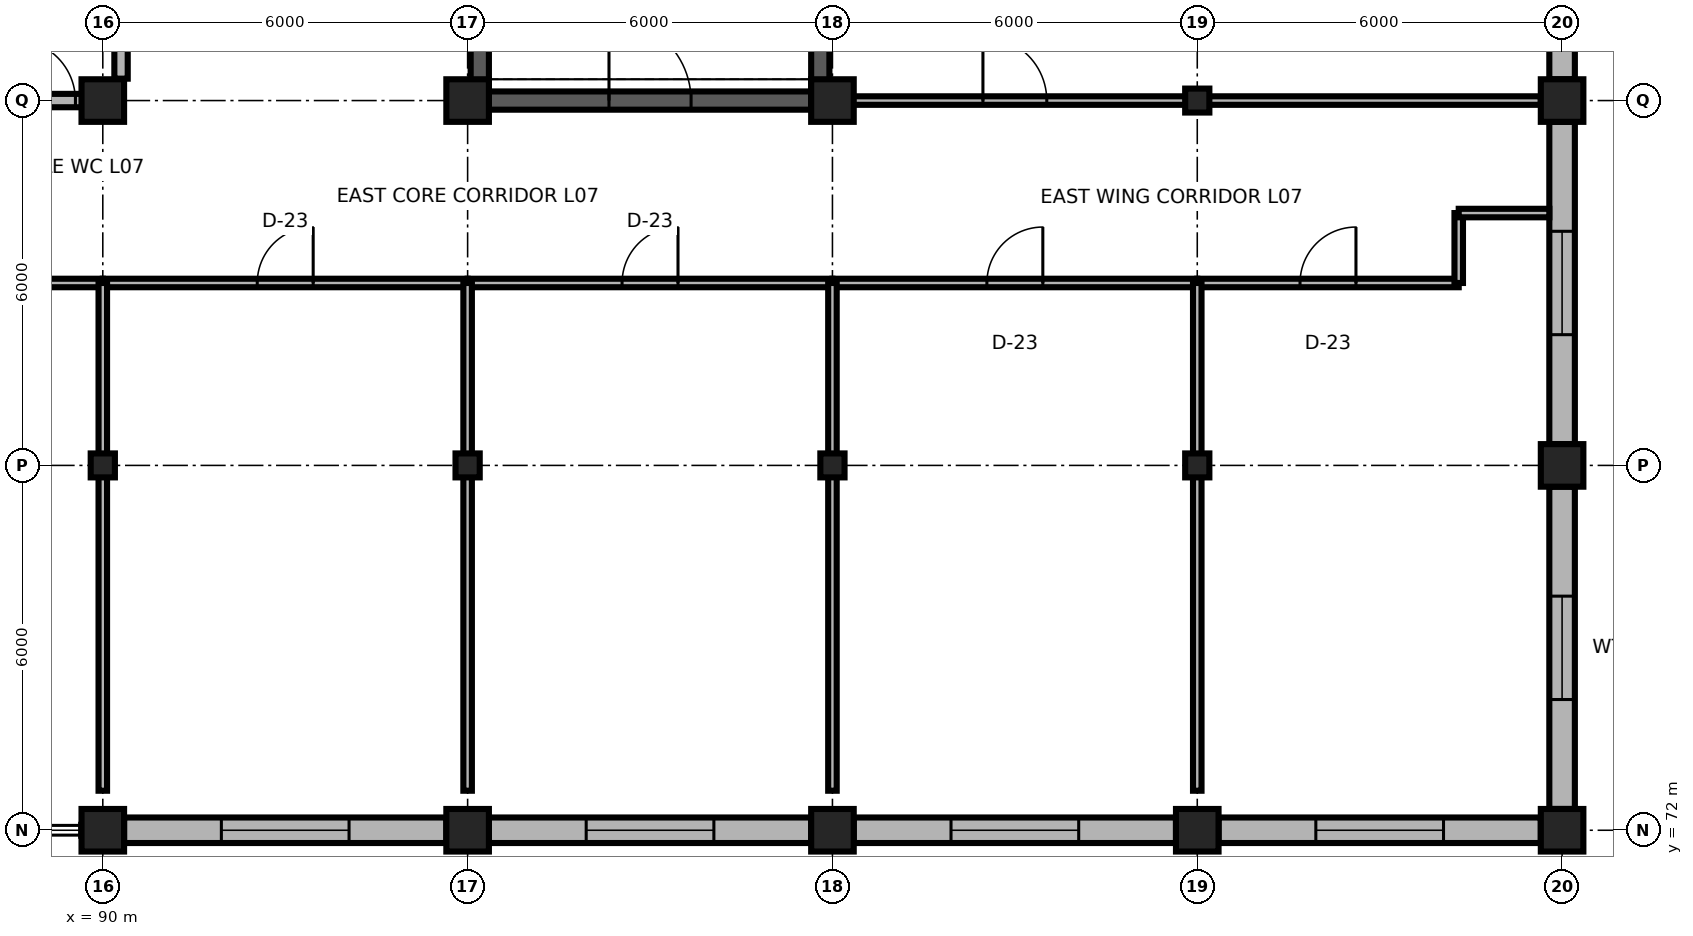
"""IFC4 building model, lengths in metres.
Left out: names, types, materials, properties, quantities, classifications, styles, units other than length and angle.
Written with IfcOpenShell. Run it as: python <this file> out.ifc"""

import sys

from ifc_helpers import new_model, si_unit, direction, frame, frame_2d, origin, origin_2d, place, context, subcontext, project, spatial, rectangle, i_section, extrude, element, fill, save


model = new_model("IFC4")
c1 = context("Model", 3, precision=1e-05, world=origin(), true_north=direction((0.0, 1.0)))
c2 = subcontext(c1, "Body", "Model", "MODEL_VIEW")
j1 = project(units=[si_unit("LENGTHUNIT", "METRE"), si_unit("PLANEANGLEUNIT", "RADIAN")], contexts=[c1])
p1 = place(None, origin())
s1 = spatial("IfcSite", under=j1, at=p1, CompositionType="ELEMENT")
p2 = place(p1, origin())
s2 = spatial("IfcBuilding", under=s1, at=p2, CompositionType="ELEMENT")
p3 = place(p2, frame((0.0, 0.0, 28.8)))
s3 = spatial("IfcBuildingStorey", under=s2, at=p3, CompositionType="ELEMENT", Elevation=28.8)
for number, where, z_axis, x_axis in (
    (1, (90.0, 72.0, 0.0), (0.0, 0.0, 1.0), (1.0, 0.0, 0.0)),
    (2, (96.0, 72.0, 0.0), (0.0, 0.0, 1.0), (1.0, 0.0, 0.0)),
    (3, (102.0, 72.0, 0.0), (0.0, 0.0, 1.0), (1.0, 0.0, 0.0)),
    (4, (108.0, 72.0, 0.0), (0.0, 0.0, 1.0), (1.0, 0.0, 0.0)),
    (5, (114.0, 72.0, 0.0), (0.0, 0.0, 1.0), (1.0, 0.0, 0.0)),
):
    element("IfcColumn", number, at=place(p3, frame(where, z_axis=z_axis, x_axis=x_axis)), inside=s3, PredefinedType="COLUMN", context=c2, shape_type="SweptSolid", body=[
        extrude(rectangle(XDim=0.7, YDim=0.7, at=origin_2d()), origin(), (0.0, 0.0, 1.0), 3.9),
    ])
for number, where, z_axis, x_axis in (
    (6, (90.0, 78.0, 0.0), (0.0, 0.0, 1.0), (1.0, 0.0, 0.0)),
    (7, (96.0, 78.0, 0.0), (0.0, 0.0, 1.0), (1.0, 0.0, 0.0)),
    (8, (102.0, 78.0, 0.0), (0.0, 0.0, 1.0), (1.0, 0.0, 0.0)),
    (9, (108.0, 78.0, 0.0), (0.0, 0.0, 1.0), (1.0, 0.0, 0.0)),
):
    element("IfcColumn", number, at=place(p3, frame(where, z_axis=z_axis, x_axis=x_axis)), inside=s3, PredefinedType="COLUMN", context=c2, shape_type="SweptSolid", body=[
        extrude(i_section(OverallWidth=0.398, OverallDepth=0.394, WebThickness=0.011, FlangeThickness=0.018, FilletRadius=0.022, at=origin_2d()), origin(), (0.0, 0.0, 1.0), 3.9),
    ])
for number, where, z_axis, x_axis in (
    (10, (114.0, 78.0, 0.0), (0.0, 0.0, 1.0), (1.0, 0.0, 0.0)),
    (11, (90.0, 84.0, 0.0), (0.0, 0.0, 1.0), (1.0, 0.0, 0.0)),
    (12, (96.0, 84.0, 0.0), (0.0, 0.0, 1.0), (1.0, 0.0, 0.0)),
    (13, (102.0, 84.0, 0.0), (0.0, 0.0, 1.0), (1.0, 0.0, 0.0)),
):
    element("IfcColumn", number, at=place(p3, frame(where, z_axis=z_axis, x_axis=x_axis)), inside=s3, PredefinedType="COLUMN", context=c2, shape_type="SweptSolid", body=[
        extrude(rectangle(XDim=0.7, YDim=0.7, at=origin_2d()), origin(), (0.0, 0.0, 1.0), 3.9),
    ])
p4 = place(p3, frame((108.0, 84.0, 0.0), z_axis=(0.0, 0.0, 1.0), x_axis=(1.0, 0.0, 0.0)))
e14 = element("IfcColumn", 14, at=p4, inside=s3, PredefinedType="COLUMN", context=c2, shape_type="SweptSolid", body=[
    extrude(i_section(OverallWidth=0.398, OverallDepth=0.394, WebThickness=0.011, FlangeThickness=0.018, FilletRadius=0.022, at=origin_2d()), origin(), (0.0, 0.0, 1.0), 3.9),
])
p5 = place(p3, frame((114.0, 84.0, 0.0), z_axis=(0.0, 0.0, 1.0), x_axis=(1.0, 0.0, 0.0)))
e15 = element("IfcColumn", 15, at=p5, inside=s3, PredefinedType="COLUMN", context=c2, shape_type="SweptSolid", body=[
    extrude(rectangle(XDim=0.7, YDim=0.7, at=origin_2d()), origin(), (0.0, 0.0, 1.0), 3.9),
])
p6 = place(p3, frame((90.35, 72.0, 0.0), z_axis=(0.0, 0.0, 1.0), x_axis=(1.0, 0.0, 0.0)))
e16 = element("IfcWall", 16, at=p6, inside=s3, PredefinedType="SOLIDWALL", context=c2, shape_type="SweptSolid", body=[
    extrude(rectangle(XDim=5.3, YDim=0.42, at=frame_2d((2.65, 0.0))), origin(), (0.0, 0.0, 1.0), 3.32),
])
p7 = place(p6, frame((1.6, 0.0, 0.85)))
e17 = element("IfcOpeningElement", 17, at=p7, cuts=e16, PredefinedType="OPENING", context=c2, shape_type="SweptSolid", body=[
    extrude(rectangle(XDim=2.1, YDim=2.1, at=frame_2d((1.05, 1.05))), frame((0.0, 0.225, 0.0), z_axis=(0.0, -1.0, 0.0), x_axis=(1.0, 0.0, 0.0)), (0.0, 0.0, 1.0), 0.45),
])
p8 = place(p3, frame((96.35, 72.0, 0.0), z_axis=(0.0, 0.0, 1.0), x_axis=(1.0, 0.0, 0.0)))
e18 = element("IfcWall", 18, at=p8, inside=s3, PredefinedType="SOLIDWALL", context=c2, shape_type="SweptSolid", body=[
    extrude(rectangle(XDim=5.3, YDim=0.42, at=frame_2d((2.65, 0.0))), origin(), (0.0, 0.0, 1.0), 3.32),
])
p9 = place(p8, frame((1.6, 0.0, 0.85)))
e19 = element("IfcOpeningElement", 19, at=p9, cuts=e18, PredefinedType="OPENING", context=c2, shape_type="SweptSolid", body=[
    extrude(rectangle(XDim=2.1, YDim=2.1, at=frame_2d((1.05, 1.05))), frame((0.0, 0.225, 0.0), z_axis=(0.0, -1.0, 0.0), x_axis=(1.0, 0.0, 0.0)), (0.0, 0.0, 1.0), 0.45),
])
p10 = place(p3, frame((102.35, 72.0, 0.0), z_axis=(0.0, 0.0, 1.0), x_axis=(1.0, 0.0, 0.0)))
e20 = element("IfcWall", 20, at=p10, inside=s3, PredefinedType="SOLIDWALL", context=c2, shape_type="SweptSolid", body=[
    extrude(rectangle(XDim=5.3, YDim=0.42, at=frame_2d((2.65, 0.0))), origin(), (0.0, 0.0, 1.0), 3.32),
])
p11 = place(p10, frame((1.6, 0.0, 0.85)))
e21 = element("IfcOpeningElement", 21, at=p11, cuts=e20, PredefinedType="OPENING", context=c2, shape_type="SweptSolid", body=[
    extrude(rectangle(XDim=2.1, YDim=2.1, at=frame_2d((1.05, 1.05))), frame((0.0, 0.225, 0.0), z_axis=(0.0, -1.0, 0.0), x_axis=(1.0, 0.0, 0.0)), (0.0, 0.0, 1.0), 0.45),
])
p12 = place(p3, frame((108.35, 72.0, 0.0), z_axis=(0.0, 0.0, 1.0), x_axis=(1.0, 0.0, 0.0)))
e22 = element("IfcWall", 22, at=p12, inside=s3, PredefinedType="SOLIDWALL", context=c2, shape_type="SweptSolid", body=[
    extrude(rectangle(XDim=5.3, YDim=0.42, at=frame_2d((2.65, 0.0))), origin(), (0.0, 0.0, 1.0), 3.32),
])
p13 = place(p12, frame((1.6, 0.0, 0.85)))
e23 = element("IfcOpeningElement", 23, at=p13, cuts=e22, PredefinedType="OPENING", context=c2, shape_type="SweptSolid", body=[
    extrude(rectangle(XDim=2.1, YDim=2.1, at=frame_2d((1.05, 1.05))), frame((0.0, 0.225, 0.0), z_axis=(0.0, -1.0, 0.0), x_axis=(1.0, 0.0, 0.0)), (0.0, 0.0, 1.0), 0.45),
])
p14 = place(p3, frame((114.0, 72.35, 0.0), z_axis=(0.0, 0.0, 1.0), x_axis=(0.0, 1.0, 0.0)))
e24 = element("IfcWall", 24, at=p14, inside=s3, PredefinedType="SOLIDWALL", context=c2, shape_type="SweptSolid", body=[
    extrude(rectangle(XDim=5.3, YDim=0.42, at=frame_2d((2.65, 0.0))), origin(), (0.0, 0.0, 1.0), 3.32),
])
p15 = place(p14, frame((1.8, 0.0, 0.85)))
e25 = element("IfcOpeningElement", 25, at=p15, cuts=e24, PredefinedType="OPENING", context=c2, shape_type="SweptSolid", body=[
    extrude(rectangle(XDim=1.7, YDim=2.05, at=frame_2d((0.85, 1.025))), frame((0.0, 0.225, 0.0), z_axis=(0.0, -1.0, 0.0), x_axis=(1.0, 0.0, 0.0)), (0.0, 0.0, 1.0), 0.45),
])
p16 = place(p3, frame((114.0, 78.35, 0.0), z_axis=(0.0, 0.0, 1.0), x_axis=(0.0, 1.0, 0.0)))
e26 = element("IfcWall", 26, at=p16, inside=s3, PredefinedType="SOLIDWALL", context=c2, shape_type="SweptSolid", body=[
    extrude(rectangle(XDim=5.3, YDim=0.42, at=frame_2d((2.65, 0.0))), origin(), (0.0, 0.0, 1.0), 3.32),
])
p17 = place(p16, frame((1.8, 0.0, 0.85)))
e27 = element("IfcOpeningElement", 27, at=p17, cuts=e26, PredefinedType="OPENING", context=c2, shape_type="SweptSolid", body=[
    extrude(rectangle(XDim=1.7, YDim=2.05, at=frame_2d((0.85, 1.025))), frame((0.0, 0.225, 0.0), z_axis=(0.0, -1.0, 0.0), x_axis=(1.0, 0.0, 0.0)), (0.0, 0.0, 1.0), 0.45),
])
p18 = place(p3, frame((114.0, 84.35, 0.0), z_axis=(0.0, 0.0, 1.0), x_axis=(0.0, 1.0, 0.0)))
e28 = element("IfcWall", 28, at=p18, inside=s3, PredefinedType="SOLIDWALL", context=c2, shape_type="SweptSolid", body=[
    extrude(rectangle(XDim=5.3, YDim=0.42, at=frame_2d((2.65, 0.0))), origin(), (0.0, 0.0, 1.0), 3.32),
])
p19 = place(p18, frame((1.8, 0.0, 0.85)))
e29 = element("IfcOpeningElement", 29, at=p19, cuts=e28, PredefinedType="OPENING", context=c2, shape_type="SweptSolid", body=[
    extrude(rectangle(XDim=1.7, YDim=2.05, at=frame_2d((0.85, 1.025))), frame((0.0, 0.225, 0.0), z_axis=(0.0, -1.0, 0.0), x_axis=(1.0, 0.0, 0.0)), (0.0, 0.0, 1.0), 0.45),
])
p20 = place(p3, frame((96.35, 84.0, 0.0), z_axis=(0.0, 0.0, 1.0), x_axis=(1.0, 0.0, 0.0)))
e30 = element("IfcWall", 30, at=p20, inside=s3, PredefinedType="SHEAR", context=c2, shape_type="SweptSolid", body=[
    extrude(rectangle(XDim=5.3, YDim=0.3, at=frame_2d((2.65, 0.0))), origin(), (0.0, 0.0, 1.0), 3.66),
])
p21 = place(p20, frame((1.975, 0.0, 0.0)))
e31 = element("IfcOpeningElement", 31, at=p21, cuts=e30, PredefinedType="OPENING", context=c2, shape_type="SweptSolid", body=[
    extrude(rectangle(XDim=1.35, YDim=2.2, at=frame_2d((0.675, 1.1))), frame((0.0, 0.165, 0.0), z_axis=(0.0, -1.0, 0.0), x_axis=(1.0, 0.0, 0.0)), (0.0, 0.0, 1.0), 0.33),
])
for number, where, z_axis, x_axis in (
    (32, (96.2, 84.0, 0.0), (0.0, 0.0, 1.0), (0.0, 1.0, 0.0)),
    (33, (101.8, 84.0, 0.0), (0.0, 0.0, 1.0), (0.0, 1.0, 0.0)),
):
    element("IfcWall", number, at=place(p3, frame(where, z_axis=z_axis, x_axis=x_axis)), inside=s3, PredefinedType="SHEAR", context=c2, shape_type="SweptSolid", body=[
        extrude(rectangle(XDim=11.8, YDim=0.3, at=frame_2d((5.9, 0.0))), origin(), (0.0, 0.0, 1.0), 3.74),
    ])
p22 = place(p3, frame((87.8, 84.0, 0.0), z_axis=(0.0, 0.0, 1.0), x_axis=(1.0, 0.0, 0.0)))
e34 = element("IfcWall", 34, at=p22, inside=s3, PredefinedType="PARTITIONING", context=c2, shape_type="SweptSolid", body=[
    extrude(rectangle(XDim=2.5, YDim=0.22, at=frame_2d((1.25, 0.0))), origin(), (0.0, 0.0, 1.0), 3.352),
])
p23 = place(p22, frame((0.75, 0.0, 0.0)))
e35 = element("IfcOpeningElement", 35, at=p23, cuts=e34, PredefinedType="OPENING", context=c2, shape_type="SweptSolid", body=[
    extrude(rectangle(XDim=1.0, YDim=2.15, at=frame_2d((0.5, 1.075))), frame((0.0, 0.125, 0.0), z_axis=(0.0, -1.0, 0.0), x_axis=(1.0, 0.0, 0.0)), (0.0, 0.0, 1.0), 0.25),
])
p24 = place(p3, frame((84.0, 81.0, 0.0), z_axis=(0.0, 0.0, 1.0), x_axis=(1.0, 0.0, 0.0)))
e36 = element("IfcWall", 36, at=p24, inside=s3, PredefinedType="PARTITIONING", context=c2, shape_type="SweptSolid", body=[
    extrude(rectangle(XDim=6.0, YDim=0.14, at=frame_2d((3.0, 0.0))), origin(), (0.0, 0.0, 1.0), 3.74),
])
p25 = place(p24, frame((2.54, 0.0, 0.0)))
e37 = element("IfcOpeningElement", 37, at=p25, cuts=e36, PredefinedType="OPENING", context=c2, shape_type="SweptSolid", body=[
    extrude(rectangle(XDim=0.92, YDim=2.15, at=frame_2d((0.46, 1.075))), frame((0.0, 0.085, 0.0), z_axis=(0.0, -1.0, 0.0), x_axis=(1.0, 0.0, 0.0)), (0.0, 0.0, 1.0), 0.17),
])
p26 = place(p3, frame((90.0, 81.0, 0.0), z_axis=(0.0, 0.0, 1.0), x_axis=(1.0, 0.0, 0.0)))
e38 = element("IfcWall", 38, at=p26, inside=s3, PredefinedType="PARTITIONING", context=c2, shape_type="SweptSolid", body=[
    extrude(rectangle(XDim=6.0, YDim=0.14, at=frame_2d((3.0, 0.0))), origin(), (0.0, 0.0, 1.0), 3.74),
])
p27 = place(p26, frame((2.54, 0.0, 0.0)))
e39 = element("IfcOpeningElement", 39, at=p27, cuts=e38, PredefinedType="OPENING", context=c2, shape_type="SweptSolid", body=[
    extrude(rectangle(XDim=0.92, YDim=2.15, at=frame_2d((0.46, 1.075))), frame((0.0, 0.085, 0.0), z_axis=(0.0, -1.0, 0.0), x_axis=(1.0, 0.0, 0.0)), (0.0, 0.0, 1.0), 0.17),
])
p28 = place(p3, frame((96.0, 81.0, 0.0), z_axis=(0.0, 0.0, 1.0), x_axis=(1.0, 0.0, 0.0)))
e40 = element("IfcWall", 40, at=p28, inside=s3, PredefinedType="PARTITIONING", context=c2, shape_type="SweptSolid", body=[
    extrude(rectangle(XDim=6.0, YDim=0.14, at=frame_2d((3.0, 0.0))), origin(), (0.0, 0.0, 1.0), 3.74),
])
p29 = place(p28, frame((2.54, 0.0, 0.0)))
e41 = element("IfcOpeningElement", 41, at=p29, cuts=e40, PredefinedType="OPENING", context=c2, shape_type="SweptSolid", body=[
    extrude(rectangle(XDim=0.92, YDim=2.15, at=frame_2d((0.46, 1.075))), frame((0.0, 0.085, 0.0), z_axis=(0.0, -1.0, 0.0), x_axis=(1.0, 0.0, 0.0)), (0.0, 0.0, 1.0), 0.17),
])
p30 = place(p3, frame((102.0, 81.0, 0.0), z_axis=(0.0, 0.0, 1.0), x_axis=(1.0, 0.0, 0.0)))
e42 = element("IfcWall", 42, at=p30, inside=s3, PredefinedType="PARTITIONING", context=c2, shape_type="SweptSolid", body=[
    extrude(rectangle(XDim=6.0, YDim=0.14, at=frame_2d((3.0, 0.0))), origin(), (0.0, 0.0, 1.0), 3.74),
])
p31 = place(p30, frame((2.54, 0.0, 0.0)))
e43 = element("IfcOpeningElement", 43, at=p31, cuts=e42, PredefinedType="OPENING", context=c2, shape_type="SweptSolid", body=[
    extrude(rectangle(XDim=0.92, YDim=2.15, at=frame_2d((0.46, 1.075))), frame((0.0, 0.085, 0.0), z_axis=(0.0, -1.0, 0.0), x_axis=(1.0, 0.0, 0.0)), (0.0, 0.0, 1.0), 0.17),
])
p32 = place(p3, frame((108.0, 81.0, 0.0), z_axis=(0.0, 0.0, 1.0), x_axis=(1.0, 0.0, 0.0)))
e44 = element("IfcWall", 44, at=p32, inside=s3, PredefinedType="PARTITIONING", context=c2, shape_type="SweptSolid", body=[
    extrude(rectangle(XDim=4.3, YDim=0.14, at=frame_2d((2.15, 0.0))), origin(), (0.0, 0.0, 1.0), 3.74),
])
p33 = place(p32, frame((1.69, 0.0, 0.0)))
e45 = element("IfcOpeningElement", 45, at=p33, cuts=e44, PredefinedType="OPENING", context=c2, shape_type="SweptSolid", body=[
    extrude(rectangle(XDim=0.92, YDim=2.15, at=frame_2d((0.46, 1.075))), frame((0.0, 0.085, 0.0), z_axis=(0.0, -1.0, 0.0), x_axis=(1.0, 0.0, 0.0)), (0.0, 0.0, 1.0), 0.17),
])
p34 = place(p3, frame((102.0, 84.0, 0.0), z_axis=(0.0, 0.0, 1.0), x_axis=(1.0, 0.0, 0.0)))
e46 = element("IfcWall", 46, at=p34, inside=s3, PredefinedType="PARTITIONING", context=c2, shape_type="SweptSolid", body=[
    extrude(rectangle(XDim=6.0, YDim=0.14, at=frame_2d((3.0, 0.0))), origin(), (0.0, 0.0, 1.0), 3.352),
])
p35 = place(p34, frame((2.475, 0.0, 0.0)))
e47 = element("IfcOpeningElement", 47, at=p35, cuts=e46, PredefinedType="OPENING", context=c2, shape_type="SweptSolid", body=[
    extrude(rectangle(XDim=1.05, YDim=2.25, at=frame_2d((0.525, 1.125))), frame((0.0, 0.085, 0.0), z_axis=(0.0, -1.0, 0.0), x_axis=(1.0, 0.0, 0.0)), (0.0, 0.0, 1.0), 0.17),
])
for number, where, z_axis, x_axis in (
    (48, (90.0, 72.65, 0.0), (0.0, 0.0, 1.0), (0.0, 1.0, 0.0)),
    (49, (96.0, 72.65, 0.0), (0.0, 0.0, 1.0), (0.0, 1.0, 0.0)),
    (50, (102.0, 72.65, 0.0), (0.0, 0.0, 1.0), (0.0, 1.0, 0.0)),
    (51, (108.0, 72.65, 0.0), (0.0, 0.0, 1.0), (0.0, 1.0, 0.0)),
):
    element("IfcWall", number, at=place(p3, frame(where, z_axis=z_axis, x_axis=x_axis)), inside=s3, PredefinedType="PARTITIONING", context=c2, shape_type="SweptSolid", body=[
        extrude(rectangle(XDim=8.35, YDim=0.14, at=frame_2d((4.175, 0.0))), origin(), (0.0, 0.0, 1.0), 3.352),
    ])
p36 = place(p3, frame((90.3, 84.36, 0.0), z_axis=(0.0, 0.0, 1.0), x_axis=(0.0, 1.0, 0.0)))
e52 = element("IfcWall", 52, at=p36, inside=s3, PredefinedType="PARTITIONING", context=c2, shape_type="SweptSolid", body=[
    extrude(rectangle(XDim=4.73, YDim=0.22, at=frame_2d((2.365, 0.0))), origin(), (0.0, 0.0, 1.0), 3.74),
])
p37 = place(p3, frame((112.3, 81.0, 0.0), z_axis=(0.0, 0.0, 1.0), x_axis=(0.0, 1.0, 0.0)))
e53 = element("IfcWall", 53, at=p37, inside=s3, PredefinedType="PARTITIONING", context=c2, shape_type="SweptSolid", body=[
    extrude(rectangle(XDim=1.15, YDim=0.14, at=frame_2d((0.575, 0.0))), origin(), (0.0, 0.0, 1.0), 3.74),
])
p38 = place(p3, frame((112.3, 82.15, 0.0), z_axis=(0.0, 0.0, 1.0), x_axis=(1.0, 0.0, 0.0)))
e54 = element("IfcWall", 54, at=p38, inside=s3, PredefinedType="PARTITIONING", context=c2, shape_type="SweptSolid", body=[
    extrude(rectangle(XDim=1.49, YDim=0.14, at=frame_2d((0.745, 0.0))), origin(), (0.0, 0.0, 1.0), 3.74),
])
p39 = place(p3, frame((108.0, 84.0, 0.0), z_axis=(0.0, 0.0, 1.0), x_axis=(1.0, 0.0, 0.0)))
e55 = element("IfcWall", 55, at=p39, inside=s3, PredefinedType="PARTITIONING", context=c2, shape_type="SweptSolid", body=[
    extrude(rectangle(XDim=5.65, YDim=0.14, at=frame_2d((2.825, 0.0))), origin(), (0.0, 0.0, 1.0), 3.352),
])
p40 = place(p7, origin())
e56 = element("IfcWindow", 56, at=p40, inside=s3, PartitioningType="SINGLE_PANEL", PredefinedType="WINDOW", context=c2, shape_type="SweptSolid", body=[
    extrude(rectangle(XDim=2.1, YDim=2.1, at=frame_2d((1.05, 1.05))), frame((0.0, 0.03, 0.0), z_axis=(0.0, -1.0, 0.0), x_axis=(1.0, 0.0, 0.0)), (0.0, 0.0, 1.0), 0.06),
])
fill(e17, e56)
p41 = place(p9, origin())
e57 = element("IfcWindow", 57, at=p41, inside=s3, PartitioningType="SINGLE_PANEL", PredefinedType="WINDOW", context=c2, shape_type="SweptSolid", body=[
    extrude(rectangle(XDim=2.1, YDim=2.1, at=frame_2d((1.05, 1.05))), frame((0.0, 0.03, 0.0), z_axis=(0.0, -1.0, 0.0), x_axis=(1.0, 0.0, 0.0)), (0.0, 0.0, 1.0), 0.06),
])
fill(e19, e57)
p42 = place(p11, origin())
e58 = element("IfcWindow", 58, at=p42, inside=s3, PartitioningType="SINGLE_PANEL", PredefinedType="WINDOW", context=c2, shape_type="SweptSolid", body=[
    extrude(rectangle(XDim=2.1, YDim=2.1, at=frame_2d((1.05, 1.05))), frame((0.0, 0.03, 0.0), z_axis=(0.0, -1.0, 0.0), x_axis=(1.0, 0.0, 0.0)), (0.0, 0.0, 1.0), 0.06),
])
fill(e21, e58)
p43 = place(p13, origin())
e59 = element("IfcWindow", 59, at=p43, inside=s3, PartitioningType="SINGLE_PANEL", PredefinedType="WINDOW", context=c2, shape_type="SweptSolid", body=[
    extrude(rectangle(XDim=2.1, YDim=2.1, at=frame_2d((1.05, 1.05))), frame((0.0, 0.03, 0.0), z_axis=(0.0, -1.0, 0.0), x_axis=(1.0, 0.0, 0.0)), (0.0, 0.0, 1.0), 0.06),
])
fill(e23, e59)
p44 = place(p15, origin())
e60 = element("IfcWindow", 60, at=p44, inside=s3, PartitioningType="SINGLE_PANEL", PredefinedType="WINDOW", context=c2, shape_type="SweptSolid", body=[
    extrude(rectangle(XDim=1.7, YDim=2.05, at=frame_2d((0.85, 1.025))), frame((0.0, 0.03, 0.0), z_axis=(0.0, -1.0, 0.0), x_axis=(1.0, 0.0, 0.0)), (0.0, 0.0, 1.0), 0.06),
])
fill(e25, e60)
p45 = place(p17, origin())
e61 = element("IfcWindow", 61, at=p45, inside=s3, PartitioningType="SINGLE_PANEL", PredefinedType="WINDOW", context=c2, shape_type="SweptSolid", body=[
    extrude(rectangle(XDim=1.7, YDim=2.05, at=frame_2d((0.85, 1.025))), frame((0.0, 0.03, 0.0), z_axis=(0.0, -1.0, 0.0), x_axis=(1.0, 0.0, 0.0)), (0.0, 0.0, 1.0), 0.06),
])
fill(e27, e61)
p46 = place(p21, origin())
e62 = element("IfcDoor", 62, at=p46, inside=s3, OperationType="SINGLE_SWING_LEFT", PredefinedType="DOOR", context=c2, shape_type="SweptSolid", body=[
    extrude(rectangle(XDim=1.35, YDim=2.2, at=frame_2d((0.675, 1.1))), frame((0.0, 0.025, 0.0), z_axis=(0.0, -1.0, 0.0), x_axis=(1.0, 0.0, 0.0)), (0.0, 0.0, 1.0), 0.05),
])
fill(e31, e62)
p47 = place(p23, origin())
e63 = element("IfcDoor", 63, at=p47, inside=s3, OperationType="SINGLE_SWING_LEFT", PredefinedType="DOOR", context=c2, shape_type="SweptSolid", body=[
    extrude(rectangle(XDim=1.0, YDim=2.15, at=frame_2d((0.5, 1.075))), frame((0.0, 0.025, 0.0), z_axis=(0.0, -1.0, 0.0), x_axis=(1.0, 0.0, 0.0)), (0.0, 0.0, 1.0), 0.05),
])
fill(e35, e63)
p48 = place(p27, origin())
e64 = element("IfcDoor", 64, at=p48, inside=s3, OperationType="SINGLE_SWING_RIGHT", PredefinedType="DOOR", context=c2, shape_type="SweptSolid", body=[
    extrude(rectangle(XDim=0.92, YDim=2.15, at=frame_2d((0.46, 1.075))), frame((0.0, 0.025, 0.0), z_axis=(0.0, -1.0, 0.0), x_axis=(1.0, 0.0, 0.0)), (0.0, 0.0, 1.0), 0.05),
])
fill(e39, e64)
p49 = place(p29, origin())
e65 = element("IfcDoor", 65, at=p49, inside=s3, OperationType="SINGLE_SWING_RIGHT", PredefinedType="DOOR", context=c2, shape_type="SweptSolid", body=[
    extrude(rectangle(XDim=0.92, YDim=2.15, at=frame_2d((0.46, 1.075))), frame((0.0, 0.025, 0.0), z_axis=(0.0, -1.0, 0.0), x_axis=(1.0, 0.0, 0.0)), (0.0, 0.0, 1.0), 0.05),
])
fill(e41, e65)
p50 = place(p31, origin())
e66 = element("IfcDoor", 66, at=p50, inside=s3, OperationType="SINGLE_SWING_RIGHT", PredefinedType="DOOR", context=c2, shape_type="SweptSolid", body=[
    extrude(rectangle(XDim=0.92, YDim=2.15, at=frame_2d((0.46, 1.075))), frame((0.0, 0.025, 0.0), z_axis=(0.0, -1.0, 0.0), x_axis=(1.0, 0.0, 0.0)), (0.0, 0.0, 1.0), 0.05),
])
fill(e43, e66)
p51 = place(p33, origin())
e67 = element("IfcDoor", 67, at=p51, inside=s3, OperationType="SINGLE_SWING_RIGHT", PredefinedType="DOOR", context=c2, shape_type="SweptSolid", body=[
    extrude(rectangle(XDim=0.92, YDim=2.15, at=frame_2d((0.46, 1.075))), frame((0.0, 0.025, 0.0), z_axis=(0.0, -1.0, 0.0), x_axis=(1.0, 0.0, 0.0)), (0.0, 0.0, 1.0), 0.05),
])
fill(e45, e67)
p52 = place(p35, origin())
e68 = element("IfcDoor", 68, at=p52, inside=s3, OperationType="SINGLE_SWING_LEFT", PredefinedType="DOOR", context=c2, shape_type="SweptSolid", body=[
    extrude(rectangle(XDim=1.05, YDim=2.25, at=frame_2d((0.525, 1.125))), frame((0.0, 0.025, 0.0), z_axis=(0.0, -1.0, 0.0), x_axis=(1.0, 0.0, 0.0)), (0.0, 0.0, 1.0), 0.05),
])
fill(e47, e68)
save(model, sys.argv[1])
